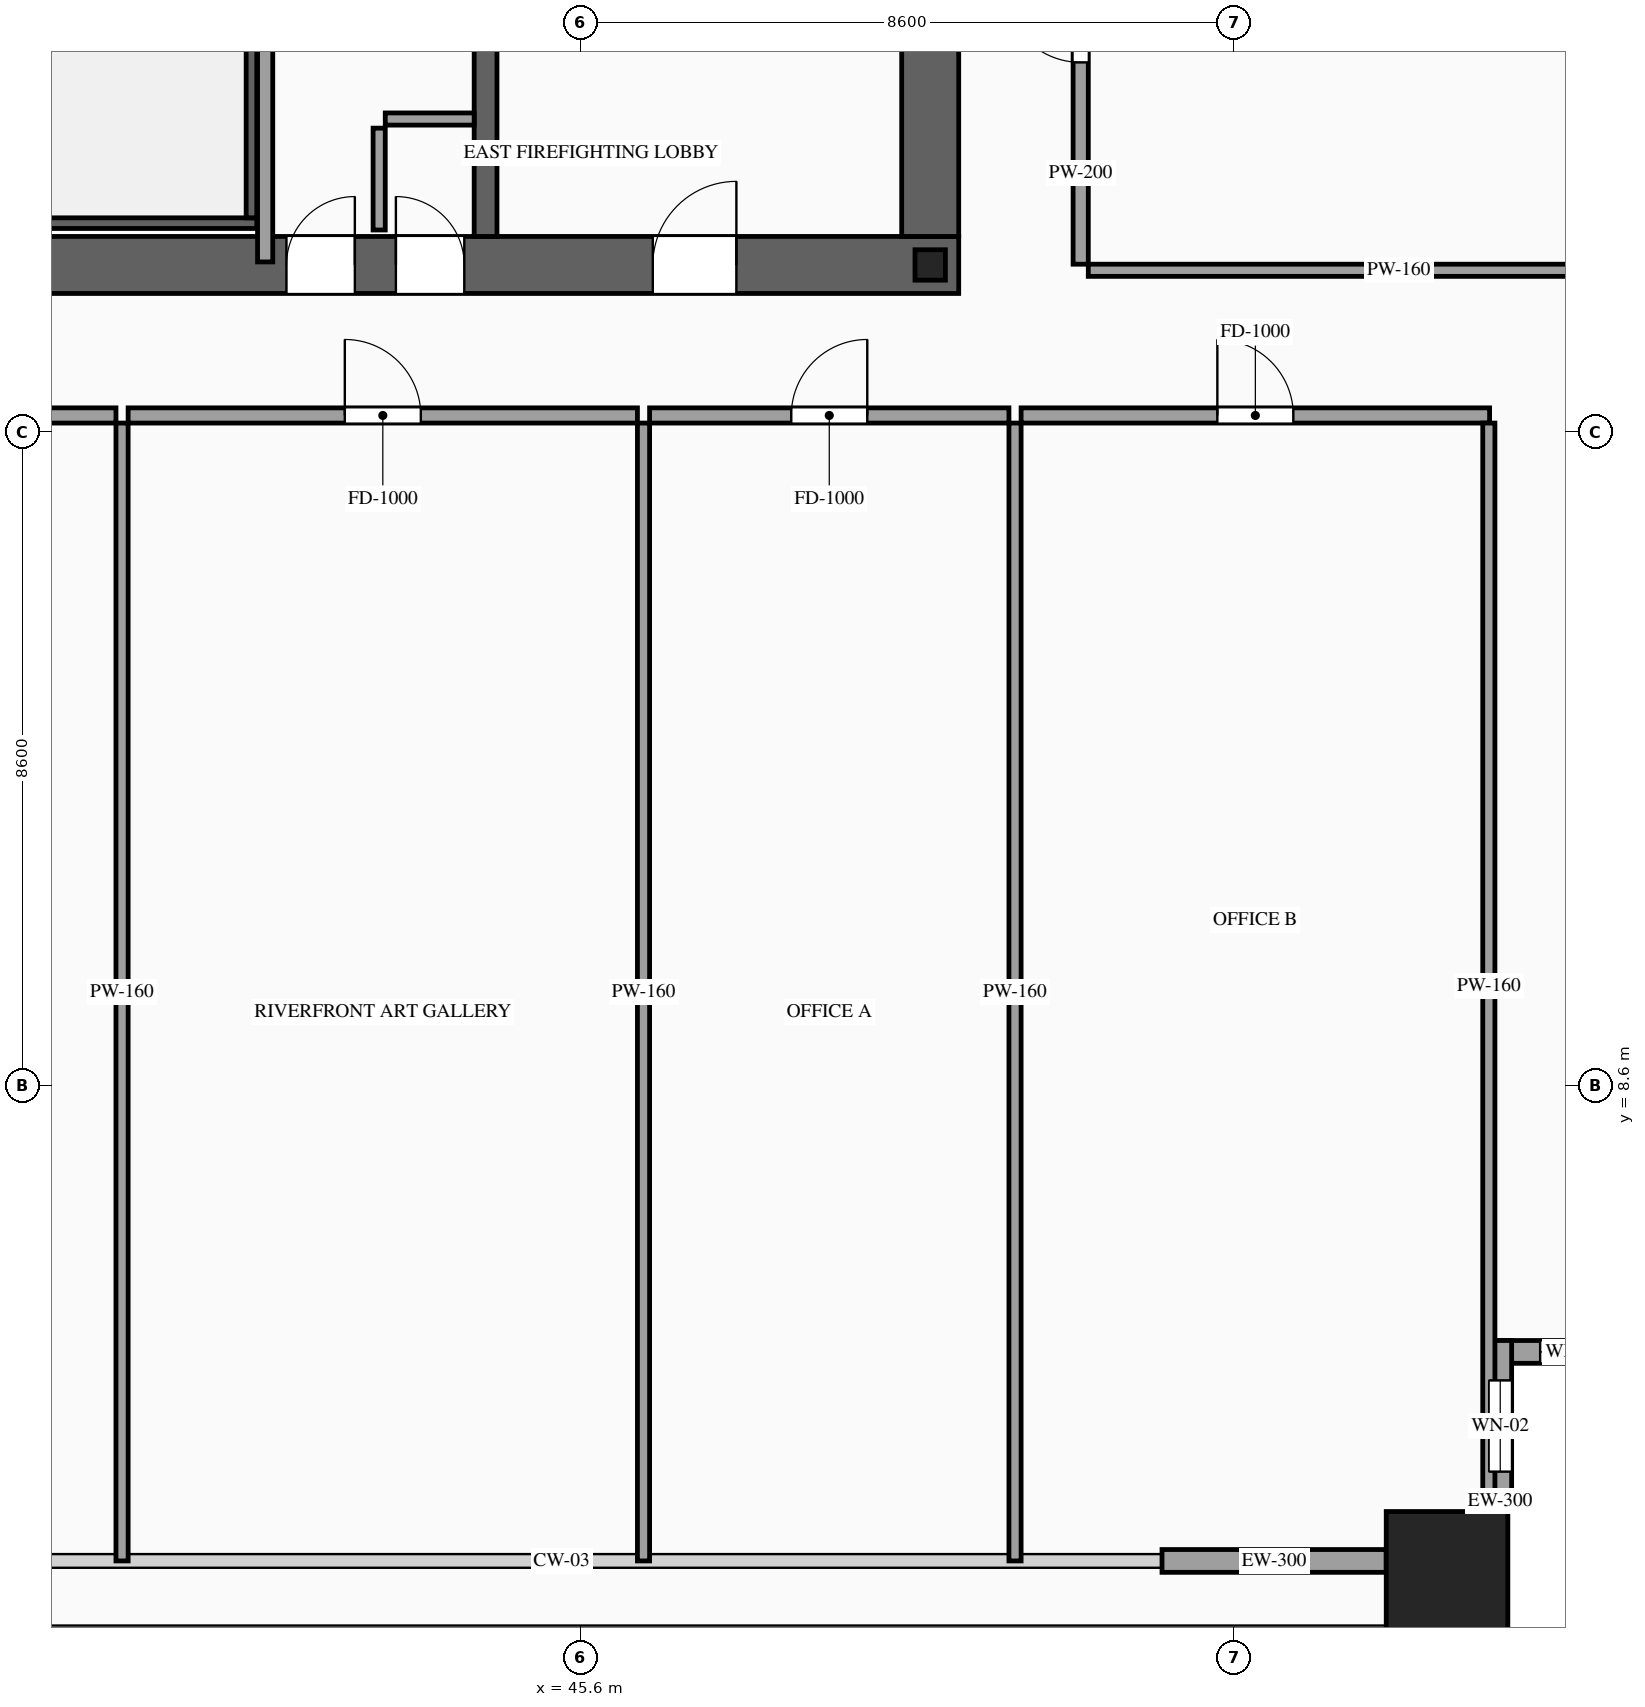
"""IFC4 building model, lengths in metres.
Left out: names, types, materials, properties, quantities, classifications, styles, units other than length and angle.
Written with IfcOpenShell. Run it as: python <this file> out.ifc"""

import sys

from ifc_helpers import new_model, si_unit, direction, frame, frame_2d, origin, origin_2d, place, context, subcontext, project, spatial, rectangle, hollow_rectangle, i_section, extrude, source, transform, mapped, element, fill, save


model = new_model("IFC4")
c1 = context("Model", 3, precision=1e-05, world=origin(), true_north=direction((0.0, 1.0)))
c2 = subcontext(c1, "Body", "Model", "MODEL_VIEW")
j1 = project(units=[si_unit("LENGTHUNIT", "METRE"), si_unit("PLANEANGLEUNIT", "RADIAN")], contexts=[c1])
p1 = place(None, origin())
s1 = spatial("IfcSite", under=j1, at=p1, CompositionType="ELEMENT")
p2 = place(p1, origin())
s2 = spatial("IfcBuilding", under=s1, at=p2, CompositionType="ELEMENT")
p3 = place(p2, frame((0.0, 0.0, 156.0)))
s3 = spatial("IfcBuildingStorey", under=s2, at=p3, CompositionType="ELEMENT", Elevation=156.0)
p4 = place(p3, frame((23.425, 19.4, 0.0), z_axis=(0.0, 0.0, 1.0), x_axis=(1.0, 0.0, 0.0)))
e1 = element("IfcWall", 1, at=p4, inside=s3, PredefinedType="SHEAR", context=c2, shape_type="SweptSolid", body=[
    extrude(rectangle(XDim=27.15, YDim=0.75, at=frame_2d((13.575, 0.0))), origin(), (0.0, 0.0, 1.0), 3.6),
])
p5 = place(p4, frame((2.025, 0.0, 0.0)))
e2 = element("IfcOpeningElement", 2, at=p5, cuts=e1, PredefinedType="OPENING", context=c2, shape_type="SweptSolid", body=[
    extrude(rectangle(XDim=1.1, YDim=2.2, at=frame_2d((0.55, 1.1))), frame((0.0, 0.39, 0.0), z_axis=(0.0, -1.0, 0.0), x_axis=(1.0, 0.0, 0.0)), (0.0, 0.0, 1.0), 0.78),
])
p6 = place(p4, frame((9.925, 0.0, 0.0)))
e3 = element("IfcOpeningElement", 3, at=p6, cuts=e1, PredefinedType="OPENING", context=c2, shape_type="SweptSolid", body=[
    extrude(rectangle(XDim=1.1, YDim=2.2, at=frame_2d((0.55, 1.1))), frame((0.0, 0.39, 0.0), z_axis=(0.0, -1.0, 0.0), x_axis=(1.0, 0.0, 0.0)), (0.0, 0.0, 1.0), 0.78),
])
p7 = place(p4, frame((23.125, 0.0, 0.0)))
e4 = element("IfcOpeningElement", 4, at=p7, cuts=e1, PredefinedType="OPENING", context=c2, shape_type="SweptSolid", body=[
    extrude(rectangle(XDim=1.1, YDim=2.2, at=frame_2d((0.55, 1.1))), frame((0.0, 0.39, 0.0), z_axis=(0.0, -1.0, 0.0), x_axis=(1.0, 0.0, 0.0)), (0.0, 0.0, 1.0), 0.78),
])
p8 = place(p4, frame((19.745, 0.0, 0.0)))
e5 = element("IfcOpeningElement", 5, at=p8, cuts=e1, PredefinedType="OPENING", context=c2, shape_type="SweptSolid", body=[
    extrude(rectangle(XDim=0.9, YDim=2.15, at=frame_2d((0.45, 1.075))), frame((0.0, 0.39, 0.0), z_axis=(0.0, -1.0, 0.0), x_axis=(1.0, 0.0, 0.0)), (0.0, 0.0, 1.0), 0.78),
])
p9 = place(p4, frame((18.305, 0.0, 0.0)))
e6 = element("IfcOpeningElement", 6, at=p9, cuts=e1, PredefinedType="OPENING", context=c2, shape_type="SweptSolid", body=[
    extrude(rectangle(XDim=0.9, YDim=2.15, at=frame_2d((0.45, 1.075))), frame((0.0, 0.39, 0.0), z_axis=(0.0, -1.0, 0.0), x_axis=(1.0, 0.0, 0.0)), (0.0, 0.0, 1.0), 0.78),
])
m1 = source(origin(), c2, "Body", "SweptSolid", [
    extrude(rectangle(XDim=12.05, YDim=0.75, at=frame_2d((6.025, 0.0))), origin(), (0.0, 0.0, 1.0), 3.6),
])
p10 = place(p3, frame((50.2, 19.775, 0.0), z_axis=(0.0, 0.0, 1.0), x_axis=(0.0, 1.0, 0.0)))
e7 = element("IfcWall", 7, at=p10, inside=s3, PredefinedType="SHEAR", context=c2, shape_type="MappedRepresentation", body=[
    mapped(m1, transform((0.0, 0.0, 0.0), scale=1.0)),
])
m2 = source(origin(), c2, "Body", "SweptSolid", [
    extrude(rectangle(XDim=12.05, YDim=0.3, at=frame_2d((6.025, 0.0))), origin(), (0.0, 0.0, 1.0), 3.6),
])
p11 = place(p3, frame((44.35, 19.775, 0.0), z_axis=(0.0, 0.0, 1.0), x_axis=(0.0, 1.0, 0.0)))
e8 = element("IfcWall", 8, at=p11, inside=s3, PredefinedType="SOLIDWALL", context=c2, shape_type="MappedRepresentation", body=[
    mapped(m2, transform((0.0, 0.0, 0.0), scale=1.0)),
])
m3 = source(origin(), c2, "Body", "SweptSolid", [
    extrude(i_section(OverallWidth=0.4, OverallDepth=0.4, WebThickness=0.013, FlangeThickness=0.021, at=origin_2d()), origin(), (0.0, 0.0, 1.0), 3.6),
])
p12 = place(p3, frame((50.2, 19.4, 0.0), z_axis=(0.0, 0.0, 1.0), x_axis=(1.0, 0.0, 0.0)))
e9 = element("IfcColumn", 9, at=p12, inside=s3, PredefinedType="COLUMN", context=c2, shape_type="MappedRepresentation", body=[
    mapped(m3, transform((0.0, 0.0, 0.0), scale=1.0)),
])
m4 = source(origin(), c2, "Body", "SweptSolid", [
    extrude(hollow_rectangle(XDim=1.6, YDim=1.6, WallThickness=0.07, at=origin_2d()), origin(), (0.0, 0.0, 1.0), 3.6),
])
p13 = place(p3, frame((57.0, 2.2, 0.0), z_axis=(0.0, 0.0, 1.0), x_axis=(1.0, 0.0, 0.0)))
e10 = element("IfcColumn", 10, at=p13, inside=s3, PredefinedType="COLUMN", context=c2, shape_type="MappedRepresentation", body=[
    mapped(m4, transform((0.0, 0.0, 0.0), scale=1.0)),
])
p14 = place(p3, frame((57.55, 5.1, 0.0), z_axis=(0.0, 0.0, 1.0), x_axis=(1.0, 0.0, 0.0)))
e11 = element("IfcWall", 11, at=p14, inside=s3, PredefinedType="SOLIDWALL", context=c2, shape_type="SweptSolid", body=[
    extrude(rectangle(XDim=2.25, YDim=0.3, at=frame_2d((1.125, 0.0))), origin(), (0.0, 0.0, 1.0), 3.38),
])
p15 = place(p14, frame((0.675, 0.0, 0.85)))
e12 = element("IfcOpeningElement", 12, at=p15, cuts=e11, PredefinedType="OPENING", context=c2, shape_type="SweptSolid", body=[
    extrude(rectangle(XDim=0.9, YDim=1.5, at=frame_2d((0.45, 0.75))), frame((0.0, 0.165, 0.0), z_axis=(0.0, -1.0, 0.0), x_axis=(1.0, 0.0, 0.0)), (0.0, 0.0, 1.0), 0.33),
])
p16 = place(p3, frame((57.7, 3.0, 0.0), z_axis=(0.0, 0.0, 1.0), x_axis=(0.0, 1.0, 0.0)))
e13 = element("IfcWall", 13, at=p16, inside=s3, PredefinedType="SOLIDWALL", context=c2, shape_type="SweptSolid", body=[
    extrude(rectangle(XDim=2.25, YDim=0.3, at=frame_2d((1.125, 0.0))), origin(), (0.0, 0.0, 1.0), 3.38),
])
p17 = place(p16, frame((0.525, 0.0, 0.85)))
e14 = element("IfcOpeningElement", 14, at=p17, cuts=e13, PredefinedType="OPENING", context=c2, shape_type="SweptSolid", body=[
    extrude(rectangle(XDim=1.2, YDim=2.1, at=frame_2d((0.6, 1.05))), frame((0.0, 0.165, 0.0), z_axis=(0.0, -1.0, 0.0), x_axis=(1.0, 0.0, 0.0)), (0.0, 0.0, 1.0), 0.33),
])
m5 = source(origin(), c2, "Body", "SweptSolid", [
    extrude(rectangle(XDim=2.95, YDim=0.3, at=frame_2d((1.475, 0.0))), origin(), (0.0, 0.0, 1.0), 2.775),
])
p18 = place(p3, frame((53.25, 2.35, 0.0), z_axis=(0.0, 0.0, 1.0), x_axis=(1.0, 0.0, 0.0)))
e15 = element("IfcWall", 15, at=p18, inside=s3, PredefinedType="SOLIDWALL", context=c2, shape_type="MappedRepresentation", body=[
    mapped(m5, transform((0.0, 0.0, 0.0), scale=1.0)),
])
m6 = source(origin(), c2, "Body", "SweptSolid", [
    extrude(rectangle(XDim=3.14, YDim=0.14, at=frame_2d((1.57, 0.0))), origin(), (0.0, 0.0, 1.0), 3.38),
])
p19 = place(p3, frame((38.2, 19.95, 0.0), z_axis=(0.0, 0.0, 1.0), x_axis=(1.0, 0.0, 0.0)))
e16 = element("IfcWall", 16, at=p19, inside=s3, PredefinedType="SOLIDWALL", context=c2, shape_type="MappedRepresentation", body=[
    mapped(m6, transform((0.0, 0.0, 0.0), scale=1.0)),
])
m7 = source(origin(), c2, "Body", "SweptSolid", [
    extrude(rectangle(XDim=8.94, YDim=0.14, at=frame_2d((4.47, 0.0))), origin(), (0.0, 0.0, 1.0), 3.38),
])
p20 = place(p3, frame((41.27, 20.02, 0.0), z_axis=(0.0, 0.0, 1.0), x_axis=(0.0, 1.0, 0.0)))
e17 = element("IfcWall", 17, at=p20, inside=s3, PredefinedType="SOLIDWALL", context=c2, shape_type="MappedRepresentation", body=[
    mapped(m7, transform((0.0, 0.0, 0.0), scale=1.0)),
])
m8 = source(origin(), c2, "Body", "SweptSolid", [
    extrude(rectangle(XDim=1.34, YDim=0.16, at=frame_2d((0.67, 0.0))), origin(), (0.0, 0.0, 1.0), 3.38),
])
p21 = place(p3, frame((42.95, 19.86, 0.0), z_axis=(0.0, 0.0, 1.0), x_axis=(0.0, 1.0, 0.0)))
e18 = element("IfcWall", 18, at=p21, inside=s3, PredefinedType="PARTITIONING", context=c2, shape_type="MappedRepresentation", body=[
    mapped(m8, transform((0.0, 0.0, 0.0), scale=1.0)),
])
m9 = source(origin(), c2, "Body", "SweptSolid", [
    extrude(rectangle(XDim=1.17, YDim=0.16, at=frame_2d((0.585, 0.0))), origin(), (0.0, 0.0, 1.0), 3.38),
])
p22 = place(p3, frame((43.03, 21.32, 0.0), z_axis=(0.0, 0.0, 1.0), x_axis=(1.0, 0.0, 0.0)))
e19 = element("IfcWall", 19, at=p22, inside=s3, PredefinedType="PARTITIONING", context=c2, shape_type="MappedRepresentation", body=[
    mapped(m9, transform((0.0, 0.0, 0.0), scale=1.0)),
])
m10 = source(origin(), c2, "Body", "SweptSolid", [
    extrude(rectangle(XDim=6.51, YDim=0.2, at=frame_2d((3.255, 0.0))), origin(), (0.0, 0.0, 1.0), 3.38),
])
p23 = place(p3, frame((41.45, 19.44, 0.0), z_axis=(0.0, 0.0, 1.0), x_axis=(0.0, 1.0, 0.0)))
e20 = element("IfcWall", 20, at=p23, inside=s3, PredefinedType="PARTITIONING", context=c2, shape_type="MappedRepresentation", body=[
    mapped(m10, transform((0.0, 0.0, 0.0), scale=1.0)),
])
p24 = place(p3, frame((34.76, 17.42, 0.0), z_axis=(0.0, 0.0, 1.0), x_axis=(1.0, 0.0, 0.0)))
e21 = element("IfcWall", 21, at=p24, inside=s3, PredefinedType="PARTITIONING", context=c2, shape_type="SweptSolid", body=[
    extrude(rectangle(XDim=4.727, YDim=0.2, at=frame_2d((2.364, 0.0))), origin(), (0.0, 0.0, 1.0), 3.38),
])
p25 = place(p24, frame((1.863, 0.0, 0.0)))
e22 = element("IfcOpeningElement", 22, at=p25, cuts=e21, PredefinedType="OPENING", context=c2, shape_type="SweptSolid", body=[
    extrude(rectangle(XDim=1.0, YDim=2.2, at=frame_2d((0.5, 1.1))), frame((0.0, 0.115, 0.0), z_axis=(0.0, -1.0, 0.0), x_axis=(1.0, 0.0, 0.0)), (0.0, 0.0, 1.0), 0.23),
])
m11 = source(origin(), c2, "Body", "SweptSolid", [
    extrude(rectangle(XDim=14.97, YDim=0.16, at=frame_2d((7.485, 0.0))), origin(), (0.0, 0.0, 1.0), 3.38),
])
p26 = place(p3, frame((39.567, 2.35, 0.0), z_axis=(0.0, 0.0, 1.0), x_axis=(0.0, 1.0, 0.0)))
e23 = element("IfcWall", 23, at=p26, inside=s3, PredefinedType="PARTITIONING", context=c2, shape_type="MappedRepresentation", body=[
    mapped(m11, transform((0.0, 0.0, 0.0), scale=1.0)),
])
p27 = place(p3, frame((39.647, 17.42, 0.0), z_axis=(0.0, 0.0, 1.0), x_axis=(1.0, 0.0, 0.0)))
e24 = element("IfcWall", 24, at=p27, inside=s3, PredefinedType="PARTITIONING", context=c2, shape_type="SweptSolid", body=[
    extrude(rectangle(XDim=6.701, YDim=0.2, at=frame_2d((3.351, 0.0))), origin(), (0.0, 0.0, 1.0), 3.38),
])
p28 = place(p27, frame((2.851, 0.0, 0.0)))
e25 = element("IfcOpeningElement", 25, at=p28, cuts=e24, PredefinedType="OPENING", context=c2, shape_type="SweptSolid", body=[
    extrude(rectangle(XDim=1.0, YDim=2.2, at=frame_2d((0.5, 1.1))), frame((0.0, 0.115, 0.0), z_axis=(0.0, -1.0, 0.0), x_axis=(1.0, 0.0, 0.0)), (0.0, 0.0, 1.0), 0.23),
])
p29 = place(p3, frame((46.428, 2.35, 0.0), z_axis=(0.0, 0.0, 1.0), x_axis=(0.0, 1.0, 0.0)))
e26 = element("IfcWall", 26, at=p29, inside=s3, PredefinedType="PARTITIONING", context=c2, shape_type="MappedRepresentation", body=[
    mapped(m11, transform((0.0, 0.0, 0.0), scale=1.0)),
])
p30 = place(p3, frame((46.508, 17.42, 0.0), z_axis=(0.0, 0.0, 1.0), x_axis=(1.0, 0.0, 0.0)))
e27 = element("IfcWall", 27, at=p30, inside=s3, PredefinedType="PARTITIONING", context=c2, shape_type="SweptSolid", body=[
    extrude(rectangle(XDim=4.728, YDim=0.2, at=frame_2d((2.364, 0.0))), origin(), (0.0, 0.0, 1.0), 3.38),
])
p31 = place(p30, frame((1.864, 0.0, 0.0)))
e28 = element("IfcOpeningElement", 28, at=p31, cuts=e27, PredefinedType="OPENING", context=c2, shape_type="SweptSolid", body=[
    extrude(rectangle(XDim=1.0, YDim=2.2, at=frame_2d((0.5, 1.1))), frame((0.0, 0.115, 0.0), z_axis=(0.0, -1.0, 0.0), x_axis=(1.0, 0.0, 0.0)), (0.0, 0.0, 1.0), 0.23),
])
p32 = place(p3, frame((51.316, 2.35, 0.0), z_axis=(0.0, 0.0, 1.0), x_axis=(0.0, 1.0, 0.0)))
e29 = element("IfcWall", 29, at=p32, inside=s3, PredefinedType="PARTITIONING", context=c2, shape_type="MappedRepresentation", body=[
    mapped(m11, transform((0.0, 0.0, 0.0), scale=1.0)),
])
p33 = place(p3, frame((51.396, 17.42, 0.0), z_axis=(0.0, 0.0, 1.0), x_axis=(1.0, 0.0, 0.0)))
e30 = element("IfcWall", 30, at=p33, inside=s3, PredefinedType="PARTITIONING", context=c2, shape_type="SweptSolid", body=[
    extrude(rectangle(XDim=6.164, YDim=0.2, at=frame_2d((3.082, 0.0))), origin(), (0.0, 0.0, 1.0), 3.38),
])
p34 = place(p33, frame((2.582, 0.0, 0.0)))
e31 = element("IfcOpeningElement", 31, at=p34, cuts=e30, PredefinedType="OPENING", context=c2, shape_type="SweptSolid", body=[
    extrude(rectangle(XDim=1.0, YDim=2.2, at=frame_2d((0.5, 1.1))), frame((0.0, 0.115, 0.0), z_axis=(0.0, -1.0, 0.0), x_axis=(1.0, 0.0, 0.0)), (0.0, 0.0, 1.0), 0.23),
])
m12 = source(origin(), c2, "Body", "SweptSolid", [
    extrude(rectangle(XDim=14.82, YDim=0.16, at=frame_2d((7.41, 0.0))), origin(), (0.0, 0.0, 1.0), 3.38),
])
p35 = place(p3, frame((57.55, 2.5, 0.0), z_axis=(0.0, 0.0, 1.0), x_axis=(0.0, 1.0, 0.0)))
e32 = element("IfcWall", 32, at=p35, inside=s3, PredefinedType="PARTITIONING", context=c2, shape_type="MappedRepresentation", body=[
    mapped(m12, transform((0.0, 0.0, 0.0), scale=1.0)),
])
p36 = place(p3, frame((52.18, 19.41, 0.0), z_axis=(0.0, 0.0, 1.0), x_axis=(0.0, 1.0, 0.0)))
e33 = element("IfcWall", 33, at=p36, inside=s3, PredefinedType="PARTITIONING", context=c2, shape_type="SweptSolid", body=[
    extrude(rectangle(XDim=6.31, YDim=0.2, at=frame_2d((3.155, 0.0))), origin(), (0.0, 0.0, 1.0), 3.38),
])
p37 = place(p36, frame((2.655, 0.0, 0.0)))
e34 = element("IfcOpeningElement", 34, at=p37, cuts=e33, PredefinedType="OPENING", context=c2, shape_type="SweptSolid", body=[
    extrude(rectangle(XDim=1.0, YDim=2.2, at=frame_2d((0.5, 1.1))), frame((0.0, 0.115, 0.0), z_axis=(0.0, -1.0, 0.0), x_axis=(1.0, 0.0, 0.0)), (0.0, 0.0, 1.0), 0.23),
])
m13 = source(origin(), c2, "Body", "SweptSolid", [
    extrude(rectangle(XDim=8.17, YDim=0.16, at=frame_2d((4.085, 0.0))), origin(), (0.0, 0.0, 1.0), 2.875),
])
p38 = place(p3, frame((52.28, 19.33, 0.0), z_axis=(0.0, 0.0, 1.0), x_axis=(1.0, 0.0, 0.0)))
e35 = element("IfcWall", 35, at=p38, inside=s3, PredefinedType="PARTITIONING", context=c2, shape_type="MappedRepresentation", body=[
    mapped(m13, transform((0.0, 0.0, 0.0), scale=1.0)),
])
m14 = source(origin(), c2, "Body", "SweptSolid", [
    extrude(rectangle(XDim=0.9, YDim=1.5, at=frame_2d((0.45, 0.75))), frame((0.0, 0.03, 0.0), z_axis=(0.0, -1.0, 0.0), x_axis=(1.0, 0.0, 0.0)), (0.0, 0.0, 1.0), 0.06),
])
p39 = place(p15, origin())
e36 = element("IfcWindow", 36, at=p39, inside=s3, PartitioningType="SINGLE_PANEL", PredefinedType="WINDOW", context=c2, shape_type="MappedRepresentation", body=[
    mapped(m14, transform((0.0, 0.0, 0.0), scale=1.0)),
])
fill(e12, e36)
m15 = source(origin(), c2, "Body", "SweptSolid", [
    extrude(rectangle(XDim=1.2, YDim=2.1, at=frame_2d((0.6, 1.05))), frame((0.0, 0.03, 0.0), z_axis=(0.0, -1.0, 0.0), x_axis=(1.0, 0.0, 0.0)), (0.0, 0.0, 1.0), 0.06),
])
p40 = place(p17, origin())
e37 = element("IfcWindow", 37, at=p40, inside=s3, PartitioningType="SINGLE_PANEL", PredefinedType="WINDOW", context=c2, shape_type="MappedRepresentation", body=[
    mapped(m15, transform((0.0, 0.0, 0.0), scale=1.0)),
])
fill(e14, e37)
m16 = source(origin(), c2, "Body", "SweptSolid", [
    extrude(rectangle(XDim=1.1, YDim=2.2, at=frame_2d((0.55, 1.1))), frame((0.0, 0.025, 0.0), z_axis=(0.0, -1.0, 0.0), x_axis=(1.0, 0.0, 0.0)), (0.0, 0.0, 1.0), 0.05),
])
p41 = place(p7, origin())
e38 = element("IfcDoor", 38, at=p41, inside=s3, OperationType="SINGLE_SWING_RIGHT", PredefinedType="DOOR", context=c2, shape_type="MappedRepresentation", body=[
    mapped(m16, transform((0.0, 0.0, 0.0), scale=1.0)),
])
fill(e4, e38)
m17 = source(origin(), c2, "Body", "SweptSolid", [
    extrude(rectangle(XDim=0.9, YDim=2.15, at=frame_2d((0.45, 1.075))), frame((0.0, 0.025, 0.0), z_axis=(0.0, -1.0, 0.0), x_axis=(1.0, 0.0, 0.0)), (0.0, 0.0, 1.0), 0.05),
])
p42 = place(p8, origin())
e39 = element("IfcDoor", 39, at=p42, inside=s3, OperationType="SINGLE_SWING_LEFT", PredefinedType="DOOR", context=c2, shape_type="MappedRepresentation", body=[
    mapped(m17, transform((0.0, 0.0, 0.0), scale=1.0)),
])
fill(e5, e39)
p43 = place(p9, origin())
e40 = element("IfcDoor", 40, at=p43, inside=s3, OperationType="SINGLE_SWING_RIGHT", PredefinedType="DOOR", context=c2, shape_type="MappedRepresentation", body=[
    mapped(m17, transform((0.0, 0.0, 0.0), scale=1.0)),
])
fill(e6, e40)
m18 = source(origin(), c2, "Body", "SweptSolid", [
    extrude(rectangle(XDim=1.0, YDim=2.2, at=frame_2d((0.5, 1.1))), frame((0.0, 0.025, 0.0), z_axis=(0.0, -1.0, 0.0), x_axis=(1.0, 0.0, 0.0)), (0.0, 0.0, 1.0), 0.05),
])
p44 = place(p28, origin())
e41 = element("IfcDoor", 41, at=p44, inside=s3, OperationType="SINGLE_SWING_LEFT", PredefinedType="DOOR", context=c2, shape_type="MappedRepresentation", body=[
    mapped(m18, transform((0.0, 0.0, 0.0), scale=1.0)),
])
fill(e25, e41)
p45 = place(p31, origin())
e42 = element("IfcDoor", 42, at=p45, inside=s3, OperationType="SINGLE_SWING_RIGHT", PredefinedType="DOOR", context=c2, shape_type="MappedRepresentation", body=[
    mapped(m18, transform((0.0, 0.0, 0.0), scale=1.0)),
])
fill(e28, e42)
p46 = place(p34, origin())
e43 = element("IfcDoor", 43, at=p46, inside=s3, OperationType="SINGLE_SWING_LEFT", PredefinedType="DOOR", context=c2, shape_type="MappedRepresentation", body=[
    mapped(m18, transform((0.0, 0.0, 0.0), scale=1.0)),
])
fill(e31, e43)
p47 = place(p37, origin())
e44 = element("IfcDoor", 44, at=p47, inside=s3, OperationType="SINGLE_SWING_RIGHT", PredefinedType="DOOR", context=c2, shape_type="MappedRepresentation", body=[
    mapped(m18, transform((0.0, 0.0, 0.0), scale=1.0)),
])
fill(e34, e44)
save(model, sys.argv[1])
